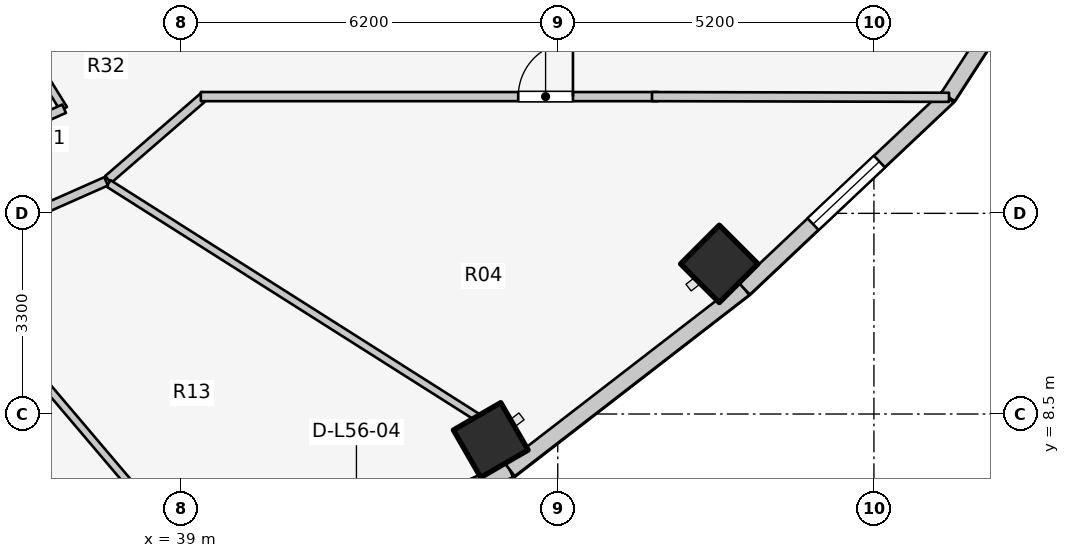
"""IFC4 building model, lengths in metres.
Left out: names, types, materials, properties, quantities, classifications, styles, units other than length and angle.
Written with IfcOpenShell. Run it as: python <this file> out.ifc"""

import sys

from ifc_helpers import new_model, si_unit, direction, frame, frame_2d, origin, origin_2d, place, context, subcontext, project, spatial, rectangle, extrude, element, fill, save


model = new_model("IFC4")
c1 = context("Model", 3, precision=1e-05, world=origin(), true_north=direction((0.0, 1.0)))
c2 = subcontext(c1, "Body", "Model", "MODEL_VIEW")
j1 = project(units=[si_unit("LENGTHUNIT", "METRE"), si_unit("PLANEANGLEUNIT", "RADIAN")], contexts=[c1])
p1 = place(None, origin())
s1 = spatial("IfcSite", under=j1, at=p1, CompositionType="ELEMENT")
p2 = place(p1, origin())
s2 = spatial("IfcBuilding", under=s1, at=p2, CompositionType="ELEMENT")
p3 = place(p2, frame((0.0, 0.0, 183.9)))
s3 = spatial("IfcBuildingStorey", under=s2, at=p3, CompositionType="ELEMENT", Elevation=183.9)
for number, where, z_axis, x_axis in (
    (1, (44.098, 8.072, 0.0), (0.0, 0.0, 1.0), (0.5, -0.866, 0.0)),
    (2, (47.857, 10.969, 0.0), (0.0, 0.0, 1.0), (0.707, -0.707, 0.0)),
):
    element("IfcColumn", number, at=place(p3, frame(where, z_axis=z_axis, x_axis=x_axis)), inside=s3, PredefinedType="COLUMN", context=c2, shape_type="SweptSolid", body=[
        extrude(rectangle(XDim=0.9, YDim=0.9, at=origin_2d()), origin(), (0.0, 0.0, 1.0), 3.1),
    ])
p4 = place(p3, frame((39.365, 5.315, 0.0), z_axis=(0.0, 0.0, 1.0), x_axis=(0.912353637112, 0.409403029847, 0.0)))
e3 = element("IfcWall", 3, at=p4, inside=s3, PredefinedType="STANDARD", context=c2, shape_type="SweptSolid", body=[
    extrude(rectangle(XDim=5.533, YDim=0.26, at=frame_2d((2.766, 0.0))), origin(), (0.0, 0.0, 1.0), 2.88),
])
p5 = place(p4, frame((2.167, 0.0, 0.0)))
e4 = element("IfcOpeningElement", 4, at=p5, cuts=e3, PredefinedType="OPENING", context=c2, shape_type="SweptSolid", body=[
    extrude(rectangle(XDim=1.2, YDim=2.2, at=frame_2d((0.6, 1.1))), frame((0.0, 0.14, 0.0), z_axis=(0.0, -1.0, 0.0), x_axis=(1.0, 0.0, 0.0)), (0.0, 0.0, 1.0), 0.28),
])
p6 = place(p3, frame((44.413, 7.581, 0.0), z_axis=(0.0, 0.0, 1.0), x_axis=(0.791460185804, 0.611220724687, 0.0)))
e5 = element("IfcWall", 5, at=p6, inside=s3, PredefinedType="STANDARD", context=c2, shape_type="SweptSolid", body=[
    extrude(rectangle(XDim=4.872, YDim=0.26, at=frame_2d((2.436, 0.0))), origin(), (0.0, 0.0, 1.0), 2.85),
])
p7 = place(p3, frame((48.269, 10.559, 0.0), z_axis=(0.0, 0.0, 1.0), x_axis=(0.727667301037, 0.68593024354, 0.0)))
e6 = element("IfcWall", 6, at=p7, inside=s3, PredefinedType="STANDARD", context=c2, shape_type="SweptSolid", body=[
    extrude(rectangle(XDim=4.604, YDim=0.26, at=frame_2d((2.302, 0.0))), origin(), (0.0, 0.0, 1.0), 2.85),
])
p8 = place(p7, frame((1.552, 0.0, 0.75)))
e7 = element("IfcOpeningElement", 7, at=p8, cuts=e6, PredefinedType="OPENING", context=c2, shape_type="SweptSolid", body=[
    extrude(rectangle(XDim=1.5, YDim=1.6, at=frame_2d((0.75, 0.8))), frame((0.0, 0.14, 0.0), z_axis=(0.0, -1.0, 0.0), x_axis=(1.0, 0.0, 0.0)), (0.0, 0.0, 1.0), 0.28),
])
p9 = place(p3, frame((51.619, 13.716, 0.0), z_axis=(0.0, 0.0, 1.0), x_axis=(0.543358984534, 0.839500454989, 0.0)))
e8 = element("IfcWall", 8, at=p9, inside=s3, PredefinedType="STANDARD", context=c2, shape_type="SweptSolid", body=[
    extrude(rectangle(XDim=4.511, YDim=0.26, at=frame_2d((2.256, 0.0))), origin(), (0.0, 0.0, 1.0), 2.85),
])
p10 = place(p9, frame((1.056, 0.0, 0.75)))
e9 = element("IfcOpeningElement", 9, at=p10, cuts=e8, PredefinedType="OPENING", context=c2, shape_type="SweptSolid", body=[
    extrude(rectangle(XDim=2.4, YDim=1.7, at=frame_2d((1.2, 0.85))), frame((0.0, 0.14, 0.0), z_axis=(0.0, -1.0, 0.0), x_axis=(1.0, 0.0, 0.0)), (0.0, 0.0, 1.0), 0.28),
])
p11 = place(p3, frame((37.807, 12.358, 0.0), z_axis=(0.0, 0.0, 1.0), x_axis=(0.756055312247, 0.654507727092, 0.0)))
e10 = element("IfcWall", 10, at=p11, inside=s3, PredefinedType="PARTITIONING", context=c2, shape_type="SweptSolid", body=[
    extrude(rectangle(XDim=2.111, YDim=0.15, at=frame_2d((1.055, 0.0))), origin(), (0.0, 0.0, 1.0), 2.299),
])
p12 = place(p3, frame((39.33, 13.72, 0.0), z_axis=(0.0, 0.0, 1.0), x_axis=(1.0, 0.0, 0.0)))
e11 = element("IfcWall", 11, at=p12, inside=s3, PredefinedType="PARTITIONING", context=c2, shape_type="SweptSolid", body=[
    extrude(rectangle(XDim=7.52, YDim=0.15, at=frame_2d((3.76, 0.0))), origin(), (0.0, 0.0, 1.0), 2.299),
])
p13 = place(p12, frame((5.22, 0.0, 0.0)))
e12 = element("IfcOpeningElement", 12, at=p13, cuts=e11, PredefinedType="OPENING", context=c2, shape_type="SweptSolid", body=[
    extrude(rectangle(XDim=0.9, YDim=2.1, at=frame_2d((0.45, 1.05))), frame((0.0, 0.085, 0.0), z_axis=(0.0, -1.0, 0.0), x_axis=(1.0, 0.0, 0.0)), (0.0, 0.0, 1.0), 0.17),
])
p14 = place(p3, frame((46.75, 13.72, 0.0), z_axis=(0.0, 0.0, 1.0), x_axis=(0.999997122315, -0.00239903348, 0.0)))
e13 = element("IfcWall", 13, at=p14, inside=s3, PredefinedType="PARTITIONING", context=c2, shape_type="SweptSolid", body=[
    extrude(rectangle(XDim=4.885, YDim=0.15, at=frame_2d((2.442, 0.0))), origin(), (0.0, 0.0, 1.0), 2.22),
])
p15 = place(p3, frame((35.55, 15.985, 0.0), z_axis=(0.0, 0.0, 1.0), x_axis=(0.525627246902, -0.850714991824, 0.0)))
e14 = element("IfcWall", 14, at=p15, inside=s3, PredefinedType="PARTITIONING", context=c2, shape_type="SweptSolid", body=[
    extrude(rectangle(XDim=2.901, YDim=0.125, at=frame_2d((1.451, 0.0))), origin(), (0.0, 0.0, 1.0), 2.299),
])
p16 = place(p3, frame((34.625, 12.423, 0.0), z_axis=(0.0, 0.0, 1.0), x_axis=(0.912888568324, 0.408208845842, 0.0)))
e15 = element("IfcWall", 15, at=p16, inside=s3, PredefinedType="PARTITIONING", context=c2, shape_type="SweptSolid", body=[
    extrude(rectangle(XDim=2.69, YDim=0.15, at=frame_2d((1.345, 0.0))), origin(), (0.0, 0.0, 1.0), 2.299),
])
p17 = place(p3, frame((35.02, 11.048, 0.0), z_axis=(0.0, 0.0, 1.0), x_axis=(0.647173462792, -0.762342776615, 0.0)))
e16 = element("IfcWall", 16, at=p17, inside=s3, PredefinedType="PARTITIONING", context=c2, shape_type="SweptSolid", body=[
    extrude(rectangle(XDim=6.253, YDim=0.125, at=frame_2d((3.127, 0.0))), origin(), (0.0, 0.0, 1.0), 2.299),
])
p18 = place(p3, frame((37.812, 12.292, 0.0), z_axis=(0.0, 0.0, 1.0), x_axis=(0.844640430122, -0.535334048799, 0.0)))
e17 = element("IfcWall", 17, at=p18, inside=s3, PredefinedType="PARTITIONING", context=c2, shape_type="SweptSolid", body=[
    extrude(rectangle(XDim=7.188, YDim=0.125, at=frame_2d((3.594, 0.0))), origin(), (0.0, 0.0, 1.0), 2.299),
])
p19 = place(p3, frame((34.976, 11.088, 0.0), z_axis=(0.0, 0.0, 1.0), x_axis=(0.914324470734, 0.404982422108, 0.0)))
e18 = element("IfcWall", 18, at=p19, inside=s3, PredefinedType="PARTITIONING", context=c2, shape_type="SweptSolid", body=[
    extrude(rectangle(XDim=3.058, YDim=0.15, at=frame_2d((1.529, 0.0))), origin(), (0.0, 0.0, 1.0), 2.299),
])
p20 = place(p19, frame((1.029, 0.0, 0.0)))
e19 = element("IfcOpeningElement", 19, at=p20, cuts=e18, PredefinedType="OPENING", context=c2, shape_type="SweptSolid", body=[
    extrude(rectangle(XDim=1.0, YDim=2.1, at=frame_2d((0.5, 1.05))), frame((0.0, 0.085, 0.0), z_axis=(0.0, -1.0, 0.0), x_axis=(1.0, 0.0, 0.0)), (0.0, 0.0, 1.0), 0.17),
])
p21 = place(p8, origin())
e20 = element("IfcWindow", 20, at=p21, inside=s3, PartitioningType="SINGLE_PANEL", PredefinedType="WINDOW", context=c2, shape_type="SweptSolid", body=[
    extrude(rectangle(XDim=1.5, YDim=1.6, at=frame_2d((0.75, 0.8))), frame((0.0, 0.03, 0.0), z_axis=(0.0, -1.0, 0.0), x_axis=(1.0, 0.0, 0.0)), (0.0, 0.0, 1.0), 0.06),
])
fill(e7, e20)
p22 = place(p13, origin())
e21 = element("IfcDoor", 21, at=p22, inside=s3, OperationType="SINGLE_SWING_RIGHT", PredefinedType="DOOR", context=c2, shape_type="SweptSolid", body=[
    extrude(rectangle(XDim=0.9, YDim=2.1, at=frame_2d((0.45, 1.05))), frame((0.0, 0.025, 0.0), z_axis=(0.0, -1.0, 0.0), x_axis=(1.0, 0.0, 0.0)), (0.0, 0.0, 1.0), 0.05),
])
fill(e12, e21)
save(model, sys.argv[1])
